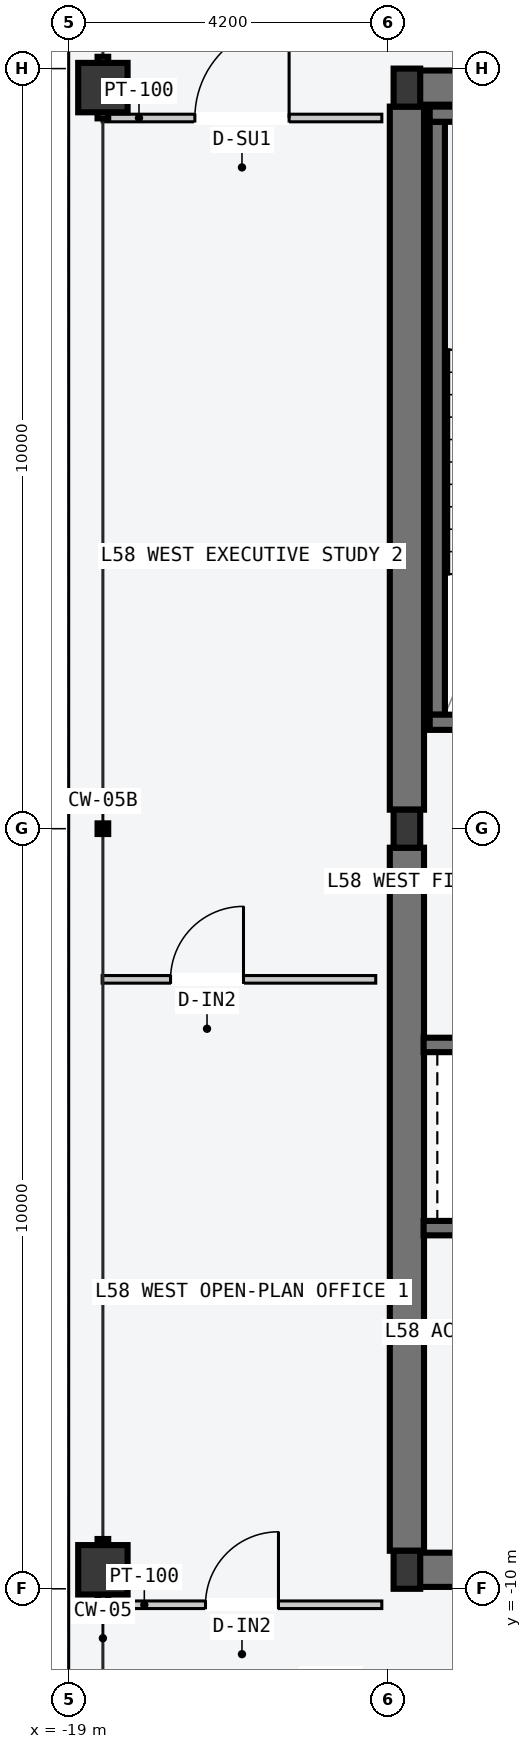
"""IFC4 building model, lengths in metres.
Left out: names, types, materials, properties, quantities, classifications, styles, units other than length and angle.
Written with IfcOpenShell. Run it as: python <this file> out.ifc"""

import sys

from ifc_helpers import new_model, si_unit, direction, frame, frame_2d, origin, origin_2d, place, context, subcontext, project, spatial, rectangle, hollow_rectangle, i_section, extrude, element, fill, save


model = new_model("IFC4")
c1 = context("Model", 3, precision=1e-05, world=origin(), true_north=direction((0.0, 1.0)))
c2 = subcontext(c1, "Body", "Model", "MODEL_VIEW")
j1 = project(units=[si_unit("LENGTHUNIT", "METRE"), si_unit("PLANEANGLEUNIT", "RADIAN")], contexts=[c1])
p1 = place(None, origin())
s1 = spatial("IfcSite", under=j1, at=p1, CompositionType="ELEMENT")
p2 = place(p1, origin())
s2 = spatial("IfcBuilding", under=s1, at=p2, CompositionType="ELEMENT")
p3 = place(p2, frame((0.0, 0.0, 222.0)))
s3 = spatial("IfcBuildingStorey", under=s2, at=p3, CompositionType="ELEMENT", Elevation=222.0)
for number, where, z_axis, x_axis in (
    (1, (-14.53, -9.75, -0.2), (0.0, 0.0, 1.0), (1.0, 0.0, 0.0)),
    (2, (-14.53, 9.75, -0.2), (0.0, 0.0, 1.0), (1.0, 0.0, 0.0)),
):
    element("IfcWall", number, at=place(p3, frame(where, z_axis=z_axis, x_axis=x_axis)), inside=s3, PredefinedType="SHEAR", context=c2, shape_type="SweptSolid", body=[
        extrude(rectangle(XDim=6.46, YDim=0.45, at=frame_2d((3.23, 0.0))), origin(), (0.0, 0.0, 1.0), 3.6),
    ])
for number, where, z_axis, x_axis in (
    (3, (-14.55, -9.5, -0.2), (0.0, 0.0, 1.0), (0.0, 1.0, 0.0)),
    (4, (-14.55, 0.25, -0.2), (0.0, 0.0, 1.0), (0.0, 1.0, 0.0)),
):
    element("IfcWall", number, at=place(p3, frame(where, z_axis=z_axis, x_axis=x_axis)), inside=s3, PredefinedType="SHEAR", context=c2, shape_type="SweptSolid", body=[
        extrude(rectangle(XDim=9.25, YDim=0.45, at=frame_2d((4.625, 0.0))), origin(), (0.0, 0.0, 1.0), 3.6),
    ])
p4 = place(p3, frame((-14.15, 1.5, -0.2), z_axis=(0.0, 0.0, 1.0), x_axis=(0.0, 1.0, 0.0)))
e5 = element("IfcWall", 5, at=p4, inside=s3, PredefinedType="SOLIDWALL", context=c2, shape_type="SweptSolid", body=[
    extrude(rectangle(XDim=7.8, YDim=0.2, at=frame_2d((3.9, 0.0))), origin(), (0.0, 0.0, 1.0), 3.6),
])
p5 = place(p3, frame((-14.25, 1.4, -0.2), z_axis=(0.0, 0.0, 1.0), x_axis=(1.0, 0.0, 0.0)))
e6 = element("IfcWall", 6, at=p5, inside=s3, PredefinedType="SOLIDWALL", context=c2, shape_type="SweptSolid", body=[
    extrude(rectangle(XDim=3.72, YDim=0.2, at=frame_2d((1.86, 0.0))), origin(), (0.0, 0.0, 1.0), 3.6),
])
p6 = place(p5, frame((1.5, 0.0, 0.2)))
e7 = element("IfcOpeningElement", 7, at=p6, cuts=e6, PredefinedType="OPENING", context=c2, shape_type="SweptSolid", body=[
    extrude(rectangle(XDim=1.12, YDim=2.18, at=frame_2d((0.56, 1.09))), frame((0.0, 0.11, 0.0), z_axis=(0.0, -1.0, 0.0), x_axis=(1.0, 0.0, 0.0)), (0.0, 0.0, 1.0), 0.22),
])
p7 = place(p3, frame((-14.25, 9.4, -0.2), z_axis=(0.0, 0.0, 1.0), x_axis=(1.0, 0.0, 0.0)))
e8 = element("IfcWall", 8, at=p7, inside=s3, PredefinedType="SOLIDWALL", context=c2, shape_type="SweptSolid", body=[
    extrude(rectangle(XDim=3.72, YDim=0.2, at=frame_2d((1.86, 0.0))), origin(), (0.0, 0.0, 1.0), 3.6),
])
for number, where, z_axis, x_axis in (
    (9, (-14.55, -9.75, 0.0), (0.0, 0.0, 1.0), (1.0, 0.0, 0.0)),
    (10, (-14.55, 0.0, 0.0), (0.0, 0.0, 1.0), (1.0, 0.0, 0.0)),
    (11, (-14.55, 9.75, 0.0), (0.0, 0.0, 1.0), (1.0, 0.0, 0.0)),
):
    element("IfcColumn", number, at=place(p3, frame(where, z_axis=z_axis, x_axis=x_axis)), inside=s3, PredefinedType="COLUMN", context=c2, shape_type="SweptSolid", body=[
        extrude(i_section(OverallWidth=0.35, OverallDepth=0.5, WebThickness=0.02, FlangeThickness=0.032, at=origin_2d()), origin(), (0.0, 0.0, 1.0), 3.6),
    ])
for number, where, z_axis, x_axis in (
    (12, (-18.55, -9.75, 0.0), (0.0, 0.0, 1.0), (0.0, 1.0, 0.0)),
    (13, (-18.55, 9.75, 0.0), (0.0, 0.0, 1.0), (0.0, 1.0, 0.0)),
):
    element("IfcColumn", number, at=place(p3, frame(where, z_axis=z_axis, x_axis=x_axis)), inside=s3, PredefinedType="COLUMN", context=c2, shape_type="SweptSolid", body=[
        extrude(hollow_rectangle(XDim=0.65, YDim=0.65, WallThickness=0.028, at=origin_2d()), origin(), (0.0, 0.0, 1.0), 3.6),
    ])
p8 = place(p3, frame((-14.33, -2.845, -0.2), z_axis=(0.0, 0.0, 1.0), x_axis=(1.0, 0.0, 0.0)))
e14 = element("IfcWall", 14, at=p8, inside=s3, PredefinedType="SOLIDWALL", context=c2, shape_type="SweptSolid", body=[
    extrude(rectangle(XDim=2.68, YDim=0.19, at=frame_2d((1.34, 0.0))), origin(), (0.0, 0.0, 1.0), 3.6),
])
p9 = place(p8, frame((0.83, 0.0, 0.2)))
e15 = element("IfcOpeningElement", 15, at=p9, cuts=e14, PredefinedType="OPENING", context=c2, shape_type="SweptSolid", body=[
    extrude(rectangle(XDim=1.2, YDim=2.2, at=frame_2d((0.6, 1.1))), frame((0.0, 0.105, 0.0), z_axis=(0.0, -1.0, 0.0), x_axis=(1.0, 0.0, 0.0)), (0.0, 0.0, 1.0), 0.21),
])
p10 = place(p3, frame((-14.33, -5.255, -0.2), z_axis=(0.0, 0.0, 1.0), x_axis=(1.0, 0.0, 0.0)))
e16 = element("IfcWall", 16, at=p10, inside=s3, PredefinedType="SOLIDWALL", context=c2, shape_type="SweptSolid", body=[
    extrude(rectangle(XDim=2.68, YDim=0.19, at=frame_2d((1.34, 0.0))), origin(), (0.0, 0.0, 1.0), 3.6),
])
p11 = place(p3, frame((-18.56, 9.35, 0.0), z_axis=(0.0, 0.0, 1.0), x_axis=(1.0, 0.0, 0.0)))
e17 = element("IfcWall", 17, at=p11, inside=s3, PredefinedType="PARTITIONING", context=c2, shape_type="SweptSolid", body=[
    extrude(rectangle(XDim=3.68, YDim=0.1, at=frame_2d((1.84, 0.0))), origin(), (0.0, 0.0, 1.0), 3.4),
])
p12 = place(p11, frame((1.22, 0.0, 0.0)))
e18 = element("IfcOpeningElement", 18, at=p12, cuts=e17, PredefinedType="OPENING", context=c2, shape_type="SweptSolid", body=[
    extrude(rectangle(XDim=1.24, YDim=2.24, at=frame_2d((0.62, 1.12))), frame((0.0, 0.06, 0.0), z_axis=(0.0, -1.0, 0.0), x_axis=(1.0, 0.0, 0.0)), (0.0, 0.0, 1.0), 0.12),
])
p13 = place(p3, frame((-18.56, -10.21, 0.0), z_axis=(0.0, 0.0, 1.0), x_axis=(1.0, 0.0, 0.0)))
e19 = element("IfcWall", 19, at=p13, inside=s3, PredefinedType="PARTITIONING", context=c2, shape_type="SweptSolid", body=[
    extrude(rectangle(XDim=3.68, YDim=0.1, at=frame_2d((1.84, 0.0))), origin(), (0.0, 0.0, 1.0), 3.4),
])
p14 = place(p13, frame((1.36, 0.0, 0.0)))
e20 = element("IfcOpeningElement", 20, at=p14, cuts=e19, PredefinedType="OPENING", context=c2, shape_type="SweptSolid", body=[
    extrude(rectangle(XDim=0.96, YDim=2.18, at=frame_2d((0.48, 1.09))), frame((0.0, 0.06, 0.0), z_axis=(0.0, -1.0, 0.0), x_axis=(1.0, 0.0, 0.0)), (0.0, 0.0, 1.0), 0.12),
])
p15 = place(p3, frame((-18.56, -1.982, 0.0), z_axis=(0.0, 0.0, 1.0), x_axis=(1.0, 0.0, 0.0)))
e21 = element("IfcWall", 21, at=p15, inside=s3, PredefinedType="PARTITIONING", context=c2, shape_type="SweptSolid", body=[
    extrude(rectangle(XDim=3.6, YDim=0.1, at=frame_2d((1.8, 0.0))), origin(), (0.0, 0.0, 1.0), 3.4),
])
p16 = place(p15, frame((0.9, 0.0, 0.0)))
e22 = element("IfcOpeningElement", 22, at=p16, cuts=e21, PredefinedType="OPENING", context=c2, shape_type="SweptSolid", body=[
    extrude(rectangle(XDim=0.96, YDim=2.18, at=frame_2d((0.48, 1.09))), frame((0.0, 0.06, 0.0), z_axis=(0.0, -1.0, 0.0), x_axis=(1.0, 0.0, 0.0)), (0.0, 0.0, 1.0), 0.12),
])
p17 = place(p12, origin())
e23 = element("IfcDoor", 23, at=p17, inside=s3, OperationType="SINGLE_SWING_RIGHT", PredefinedType="DOOR", context=c2, shape_type="SweptSolid", body=[
    extrude(rectangle(XDim=1.24, YDim=2.24, at=frame_2d((0.62, 1.12))), frame((0.0, 0.025, 0.0), z_axis=(0.0, -1.0, 0.0), x_axis=(1.0, 0.0, 0.0)), (0.0, 0.0, 1.0), 0.05),
])
fill(e18, e23)
p18 = place(p14, origin())
e24 = element("IfcDoor", 24, at=p18, inside=s3, OperationType="SINGLE_SWING_RIGHT", PredefinedType="DOOR", context=c2, shape_type="SweptSolid", body=[
    extrude(rectangle(XDim=0.96, YDim=2.18, at=frame_2d((0.48, 1.09))), frame((0.0, 0.025, 0.0), z_axis=(0.0, -1.0, 0.0), x_axis=(1.0, 0.0, 0.0)), (0.0, 0.0, 1.0), 0.05),
])
fill(e20, e24)
p19 = place(p16, origin())
e25 = element("IfcDoor", 25, at=p19, inside=s3, OperationType="SINGLE_SWING_RIGHT", PredefinedType="DOOR", context=c2, shape_type="SweptSolid", body=[
    extrude(rectangle(XDim=0.96, YDim=2.18, at=frame_2d((0.48, 1.09))), frame((0.0, 0.025, 0.0), z_axis=(0.0, -1.0, 0.0), x_axis=(1.0, 0.0, 0.0)), (0.0, 0.0, 1.0), 0.05),
])
fill(e22, e25)
save(model, sys.argv[1])
